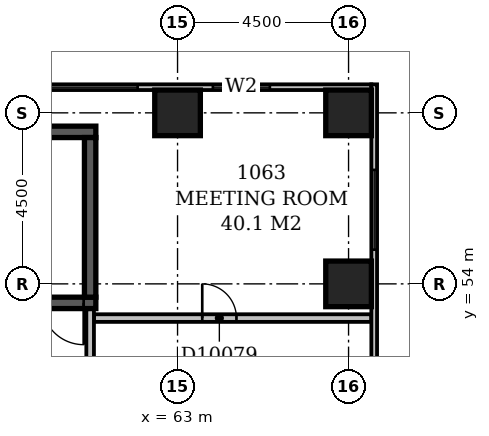
"""IFC4 building model, lengths in metres.
Left out: names, types, materials, properties, quantities, classifications, styles, units other than length and angle.
Written with IfcOpenShell. Run it as: python <this file> out.ifc"""

import sys

from ifc_helpers import new_model, si_unit, direction, frame, frame_2d, origin, origin_2d, place, context, subcontext, project, spatial, rectangle, extrude, element, fill, save


model = new_model("IFC4")
c1 = context("Model", 3, precision=1e-05, world=origin(), true_north=direction((0.0, 1.0)))
c2 = subcontext(c1, "Body", "Model", "MODEL_VIEW")
j1 = project(units=[si_unit("LENGTHUNIT", "METRE"), si_unit("PLANEANGLEUNIT", "RADIAN")], contexts=[c1])
p1 = place(None, origin())
s1 = spatial("IfcSite", under=j1, at=p1, CompositionType="ELEMENT")
p2 = place(p1, origin())
s2 = spatial("IfcBuilding", under=s1, at=p2, CompositionType="ELEMENT")
p3 = place(p2, frame((0.0, 0.0, 47.0)))
s3 = spatial("IfcBuildingStorey", under=s2, at=p3, CompositionType="ELEMENT", Elevation=47.0)
p4 = place(p3, frame((53.85, 53.5, -0.3), z_axis=(0.0, 0.0, 1.0), x_axis=(1.0, 0.0, 0.0)))
e1 = element("IfcWall", 1, at=p4, inside=s3, PredefinedType="SHEAR", context=c2, shape_type="SweptSolid", body=[
    extrude(rectangle(XDim=7.0, YDim=0.3, at=frame_2d((3.5, 0.0))), origin(), (0.0, 0.0, 1.0), 3.6),
])
p5 = place(p4, frame((5.58, 0.0, 0.3)))
e2 = element("IfcOpeningElement", 2, at=p5, cuts=e1, PredefinedType="OPENING", context=c2, shape_type="SweptSolid", body=[
    extrude(rectangle(XDim=1.1, YDim=2.1, at=frame_2d((0.55, 1.05))), frame((0.0, 0.162, 0.0), z_axis=(0.0, -1.0, 0.0), x_axis=(1.0, 0.0, 0.0)), (0.0, 0.0, 1.0), 0.324),
])
p6 = place(p3, frame((53.85, 58.0, -0.3), z_axis=(0.0, 0.0, 1.0), x_axis=(1.0, 0.0, 0.0)))
e3 = element("IfcWall", 3, at=p6, inside=s3, PredefinedType="SHEAR", context=c2, shape_type="SweptSolid", body=[
    extrude(rectangle(XDim=7.0, YDim=0.3, at=frame_2d((3.5, 0.0))), origin(), (0.0, 0.0, 1.0), 3.6),
])
p7 = place(p3, frame((60.7, 53.65, -0.3), z_axis=(0.0, 0.0, 1.0), x_axis=(0.0, 1.0, 0.0)))
e4 = element("IfcWall", 4, at=p7, inside=s3, PredefinedType="SHEAR", context=c2, shape_type="SweptSolid", body=[
    extrude(rectangle(XDim=4.2, YDim=0.3, at=frame_2d((2.1, 0.0))), origin(), (0.0, 0.0, 1.0), 3.6),
])
for number, where, z_axis, x_axis in (
    (5, (67.5, 54.0, -0.3), (0.0, 0.0, 1.0), (1.0, 0.0, 0.0)),
    (6, (63.0, 58.5, -0.3), (0.0, 0.0, 1.0), (1.0, 0.0, 0.0)),
    (7, (67.5, 58.5, -0.3), (0.0, 0.0, 1.0), (1.0, 0.0, 0.0)),
):
    element("IfcColumn", number, at=place(p3, frame(where, z_axis=z_axis, x_axis=x_axis)), inside=s3, PredefinedType="COLUMN", context=c2, shape_type="SweptSolid", body=[
        extrude(rectangle(XDim=1.2, YDim=1.2, at=origin_2d()), origin(), (0.0, 0.0, 1.0), 3.6),
    ])
p8 = place(p3, frame((68.175, 35.4, 0.0), z_axis=(0.0, 0.0, 1.0), x_axis=(0.0, 1.0, 0.0)))
e8 = element("IfcWall", 8, at=p8, inside=s3, PredefinedType="STANDARD", context=c2, shape_type="SweptSolid", body=[
    extrude(rectangle(XDim=23.85, YDim=0.15, at=frame_2d((11.925, 0.0))), origin(), (0.0, 0.0, 1.0), 2.7),
])
p9 = place(p8, frame((2.67, 0.0, 0.6)))
e9 = element("IfcOpeningElement", 9, at=p9, cuts=e8, PredefinedType="OPENING", context=c2, shape_type="SweptSolid", body=[
    extrude(rectangle(XDim=1.5, YDim=1.8, at=frame_2d((0.75, 0.9))), frame((0.0, 0.087, 0.0), z_axis=(0.0, -1.0, 0.0), x_axis=(1.0, 0.0, 0.0)), (0.0, 0.0, 1.0), 0.174),
])
p10 = place(p8, frame((10.65, 0.0, 0.6)))
e10 = element("IfcOpeningElement", 10, at=p10, cuts=e8, PredefinedType="OPENING", context=c2, shape_type="SweptSolid", body=[
    extrude(rectangle(XDim=2.4, YDim=1.8, at=frame_2d((1.2, 0.9))), frame((0.0, 0.087, 0.0), z_axis=(0.0, -1.0, 0.0), x_axis=(1.0, 0.0, 0.0)), (0.0, 0.0, 1.0), 0.174),
])
p11 = place(p8, frame((19.5, 0.0, 0.6)))
e11 = element("IfcOpeningElement", 11, at=p11, cuts=e8, PredefinedType="OPENING", context=c2, shape_type="SweptSolid", body=[
    extrude(rectangle(XDim=2.1, YDim=1.8, at=frame_2d((1.05, 0.9))), frame((0.0, 0.087, 0.0), z_axis=(0.0, -1.0, 0.0), x_axis=(1.0, 0.0, 0.0)), (0.0, 0.0, 1.0), 0.174),
])
p12 = place(p3, frame((68.1, 59.175, 0.0), z_axis=(0.0, 0.0, 1.0), x_axis=(-1.0, 0.0, 0.0)))
e12 = element("IfcWall", 12, at=p12, inside=s3, PredefinedType="STANDARD", context=c2, shape_type="SweptSolid", body=[
    extrude(rectangle(XDim=68.85, YDim=0.15, at=frame_2d((34.425, 0.0))), origin(), (0.0, 0.0, 1.0), 2.7),
])
p13 = place(p12, frame((2.67, 0.0, 0.6)))
e13 = element("IfcOpeningElement", 13, at=p13, cuts=e12, PredefinedType="OPENING", context=c2, shape_type="SweptSolid", body=[
    extrude(rectangle(XDim=1.5, YDim=1.8, at=frame_2d((0.75, 0.9))), frame((0.0, 0.087, 0.0), z_axis=(0.0, -1.0, 0.0), x_axis=(1.0, 0.0, 0.0)), (0.0, 0.0, 1.0), 0.174),
])
p14 = place(p12, frame((6.15, 0.0, 0.6)))
e14 = element("IfcOpeningElement", 14, at=p14, cuts=e12, PredefinedType="OPENING", context=c2, shape_type="SweptSolid", body=[
    extrude(rectangle(XDim=2.4, YDim=1.8, at=frame_2d((1.2, 0.9))), frame((0.0, 0.087, 0.0), z_axis=(0.0, -1.0, 0.0), x_axis=(1.0, 0.0, 0.0)), (0.0, 0.0, 1.0), 0.174),
])
p15 = place(p12, frame((37.65, 0.0, 0.6)))
e15 = element("IfcOpeningElement", 15, at=p15, cuts=e12, PredefinedType="OPENING", context=c2, shape_type="SweptSolid", body=[
    extrude(rectangle(XDim=2.4, YDim=1.8, at=frame_2d((1.2, 0.9))), frame((0.0, 0.087, 0.0), z_axis=(0.0, -1.0, 0.0), x_axis=(1.0, 0.0, 0.0)), (0.0, 0.0, 1.0), 0.174),
])
p16 = place(p3, frame((60.7, 51.6, 0.0), z_axis=(0.0, 0.0, 1.0), x_axis=(0.0, 1.0, 0.0)))
e16 = element("IfcWall", 16, at=p16, inside=s3, PredefinedType="PARTITIONING", context=c2, shape_type="SweptSolid", body=[
    extrude(rectangle(XDim=1.73, YDim=0.2, at=frame_2d((0.865, 0.0))), origin(), (0.0, 0.0, 1.0), 3.3),
])
p17 = place(p3, frame((60.8, 53.1, 0.0), z_axis=(0.0, 0.0, 1.0), x_axis=(1.0, 0.0, 0.0)))
e17 = element("IfcWall", 17, at=p17, inside=s3, PredefinedType="PARTITIONING", context=c2, shape_type="SweptSolid", body=[
    extrude(rectangle(XDim=7.3, YDim=0.2, at=frame_2d((3.65, 0.0))), origin(), (0.0, 0.0, 1.0), 3.3),
])
p18 = place(p17, frame((2.85, 0.0, 0.0)))
e18 = element("IfcOpeningElement", 18, at=p18, cuts=e17, PredefinedType="OPENING", context=c2, shape_type="SweptSolid", body=[
    extrude(rectangle(XDim=0.9, YDim=2.1, at=frame_2d((0.45, 1.05))), frame((0.0, 0.112, 0.0), z_axis=(0.0, -1.0, 0.0), x_axis=(1.0, 0.0, 0.0)), (0.0, 0.0, 1.0), 0.224),
])
p19 = place(p11, origin())
e19 = element("IfcWindow", 19, at=p19, inside=s3, PartitioningType="SINGLE_PANEL", PredefinedType="WINDOW", context=c2, shape_type="SweptSolid", body=[
    extrude(rectangle(XDim=2.1, YDim=1.8, at=frame_2d((1.05, 0.9))), frame((0.0, 0.03, 0.0), z_axis=(0.0, -1.0, 0.0), x_axis=(1.0, 0.0, 0.0)), (0.0, 0.0, 1.0), 0.06),
])
fill(e11, e19)
p20 = place(p13, origin())
e20 = element("IfcWindow", 20, at=p20, inside=s3, PartitioningType="SINGLE_PANEL", PredefinedType="WINDOW", context=c2, shape_type="SweptSolid", body=[
    extrude(rectangle(XDim=1.5, YDim=1.8, at=frame_2d((0.75, 0.9))), frame((0.0, 0.03, 0.0), z_axis=(0.0, -1.0, 0.0), x_axis=(1.0, 0.0, 0.0)), (0.0, 0.0, 1.0), 0.06),
])
fill(e13, e20)
p21 = place(p14, origin())
e21 = element("IfcWindow", 21, at=p21, inside=s3, PartitioningType="SINGLE_PANEL", PredefinedType="WINDOW", context=c2, shape_type="SweptSolid", body=[
    extrude(rectangle(XDim=2.4, YDim=1.8, at=frame_2d((1.2, 0.9))), frame((0.0, 0.03, 0.0), z_axis=(0.0, -1.0, 0.0), x_axis=(1.0, 0.0, 0.0)), (0.0, 0.0, 1.0), 0.06),
])
fill(e14, e21)
p22 = place(p5, origin())
e22 = element("IfcDoor", 22, at=p22, inside=s3, OperationType="SINGLE_SWING_RIGHT", PredefinedType="DOOR", context=c2, shape_type="SweptSolid", body=[
    extrude(rectangle(XDim=1.1, YDim=2.1, at=frame_2d((0.55, 1.05))), frame((0.0, 0.025, 0.0), z_axis=(0.0, -1.0, 0.0), x_axis=(1.0, 0.0, 0.0)), (0.0, 0.0, 1.0), 0.05),
])
fill(e2, e22)
p23 = place(p18, origin())
e23 = element("IfcDoor", 23, at=p23, inside=s3, OperationType="SINGLE_SWING_LEFT", PredefinedType="DOOR", context=c2, shape_type="SweptSolid", body=[
    extrude(rectangle(XDim=0.9, YDim=2.1, at=frame_2d((0.45, 1.05))), frame((0.0, 0.025, 0.0), z_axis=(0.0, -1.0, 0.0), x_axis=(1.0, 0.0, 0.0)), (0.0, 0.0, 1.0), 0.05),
])
fill(e18, e23)
save(model, sys.argv[1])
